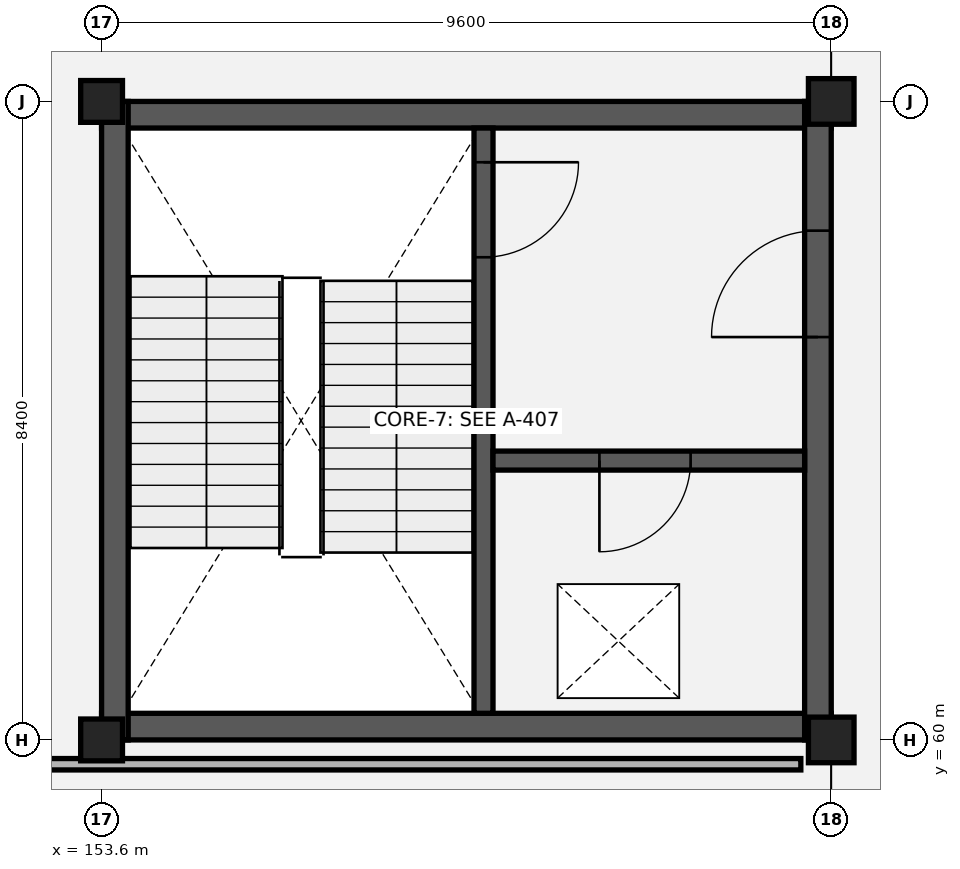
"""IFC4 building model, lengths in metres.
Left out: names, types, materials, properties, quantities, classifications, styles, units other than length and angle.
Written with IfcOpenShell. Run it as: python <this file> out.ifc"""

import sys

from ifc_helpers import new_model, si_unit, direction, frame, frame_2d, origin, origin_2d, place, context, subcontext, project, spatial, rectangle, extrude, element, fill, save


model = new_model("IFC4")
c1 = context("Model", 3, precision=1e-05, world=origin(), true_north=direction((0.0, 1.0)))
c2 = subcontext(c1, "Body", "Model", "MODEL_VIEW")
j1 = project(units=[si_unit("LENGTHUNIT", "METRE"), si_unit("PLANEANGLEUNIT", "RADIAN")], contexts=[c1])
p1 = place(None, origin())
s1 = spatial("IfcSite", under=j1, at=p1, CompositionType="ELEMENT")
p2 = place(p1, origin())
s2 = spatial("IfcBuilding", under=s1, at=p2, CompositionType="ELEMENT")
p3 = place(p2, frame((0.0, 0.0, 5.4)))
s3 = spatial("IfcBuildingStorey", under=s2, at=p3, CompositionType="ELEMENT", Elevation=5.4)
for number, where, z_axis, x_axis in (
    (1, (153.6, 60.0, 0.0), (0.0, 0.0, 1.0), (1.0, 0.0, 0.0)),
    (2, (153.6, 68.4, 0.0), (0.0, 0.0, 1.0), (1.0, 0.0, 0.0)),
):
    element("IfcColumn", number, at=place(p3, frame(where, z_axis=z_axis, x_axis=x_axis)), inside=s3, PredefinedType="COLUMN", context=c2, shape_type="SweptSolid", body=[
        extrude(rectangle(XDim=0.55, YDim=0.55, at=origin_2d()), origin(), (0.0, 0.0, 1.0), 4.8),
    ])
for number, where, z_axis, x_axis in (
    (3, (163.2, 60.0, 0.0), (0.0, 0.0, 1.0), (1.0, 0.0, 0.0)),
    (4, (163.2, 68.4, 0.0), (0.0, 0.0, 1.0), (1.0, 0.0, 0.0)),
):
    element("IfcColumn", number, at=place(p3, frame(where, z_axis=z_axis, x_axis=x_axis)), inside=s3, PredefinedType="COLUMN", context=c2, shape_type="SweptSolid", body=[
        extrude(rectangle(XDim=0.6, YDim=0.6, at=origin_2d()), origin(), (0.0, 0.0, 1.0), 4.8),
    ])
for number, where, z_axis, x_axis in (
    (5, (153.6, 68.225, 0.0), (0.0, 0.0, 1.0), (1.0, 0.0, 0.0)),
    (6, (153.6, 60.175, 0.0), (0.0, 0.0, 1.0), (1.0, 0.0, 0.0)),
):
    element("IfcWall", number, at=place(p3, frame(where, z_axis=z_axis, x_axis=x_axis)), inside=s3, PredefinedType="SHEAR", context=c2, shape_type="SweptSolid", body=[
        extrude(rectangle(XDim=9.6, YDim=0.35, at=frame_2d((4.8, 0.0))), origin(), (0.0, 0.0, 1.0), 4.48),
    ])
p4 = place(p3, frame((153.775, 60.0, 0.0), z_axis=(0.0, 0.0, 1.0), x_axis=(0.0, 1.0, 0.0)))
e7 = element("IfcWall", 7, at=p4, inside=s3, PredefinedType="SHEAR", context=c2, shape_type="SweptSolid", body=[
    extrude(rectangle(XDim=8.4, YDim=0.35, at=frame_2d((4.2, 0.0))), origin(), (0.0, 0.0, 1.0), 4.48),
])
p5 = place(p3, frame((163.025, 60.0, 0.0), z_axis=(0.0, 0.0, 1.0), x_axis=(0.0, 1.0, 0.0)))
e8 = element("IfcWall", 8, at=p5, inside=s3, PredefinedType="SHEAR", context=c2, shape_type="SweptSolid", body=[
    extrude(rectangle(XDim=8.4, YDim=0.35, at=frame_2d((4.2, 0.0))), origin(), (0.0, 0.0, 1.0), 4.48),
])
p6 = place(p5, frame((5.3, 0.0, 0.0)))
e9 = element("IfcOpeningElement", 9, at=p6, cuts=e8, PredefinedType="OPENING", context=c2, shape_type="SweptSolid", body=[
    extrude(rectangle(XDim=1.4, YDim=2.15, at=frame_2d((0.7, 1.075))), frame((0.0, 0.185, 0.0), z_axis=(0.0, -1.0, 0.0), x_axis=(1.0, 0.0, 0.0)), (0.0, 0.0, 1.0), 0.37),
])
p7 = place(p3, frame((158.625, 68.05, 0.0), z_axis=(0.0, 0.0, 1.0), x_axis=(0.0, -1.0, 0.0)))
e10 = element("IfcWall", 10, at=p7, inside=s3, PredefinedType="SHEAR", context=c2, shape_type="SweptSolid", body=[
    extrude(rectangle(XDim=7.7, YDim=0.25, at=frame_2d((3.85, 0.0))), origin(), (0.0, 0.0, 1.0), 4.48),
])
p8 = place(p7, frame((0.45, 0.0, 0.0)))
e11 = element("IfcOpeningElement", 11, at=p8, cuts=e10, PredefinedType="OPENING", context=c2, shape_type="SweptSolid", body=[
    extrude(rectangle(XDim=1.25, YDim=2.15, at=frame_2d((0.625, 1.075))), frame((0.0, 0.135, 0.0), z_axis=(0.0, -1.0, 0.0), x_axis=(1.0, 0.0, 0.0)), (0.0, 0.0, 1.0), 0.27),
])
p9 = place(p3, frame((158.75, 63.675, 0.0), z_axis=(0.0, 0.0, 1.0), x_axis=(1.0, 0.0, 0.0)))
e12 = element("IfcWall", 12, at=p9, inside=s3, PredefinedType="SHEAR", context=c2, shape_type="SweptSolid", body=[
    extrude(rectangle(XDim=4.1, YDim=0.25, at=frame_2d((2.05, 0.0))), origin(), (0.0, 0.0, 1.0), 4.48),
])
p10 = place(p9, frame((1.4, 0.0, 0.0)))
e13 = element("IfcOpeningElement", 13, at=p10, cuts=e12, PredefinedType="OPENING", context=c2, shape_type="SweptSolid", body=[
    extrude(rectangle(XDim=1.2, YDim=2.15, at=frame_2d((0.6, 1.075))), frame((0.0, 0.135, 0.0), z_axis=(0.0, -1.0, 0.0), x_axis=(1.0, 0.0, 0.0)), (0.0, 0.0, 1.0), 0.27),
])
p11 = place(p3, frame((145.0, 59.68, 0.0), z_axis=(0.0, 0.0, 1.0), x_axis=(1.0, 0.0, 0.0)))
e14 = element("IfcWall", 14, at=p11, inside=s3, PredefinedType="PARTITIONING", context=c2, shape_type="SweptSolid", body=[
    extrude(rectangle(XDim=17.8, YDim=0.15, at=frame_2d((8.9, 0.0))), origin(), (0.0, 0.0, 1.0), 3.26),
])
p12 = place(p8, origin())
e15 = element("IfcDoor", 15, at=p12, inside=s3, OperationType="SINGLE_SWING_LEFT", PredefinedType="DOOR", context=c2, shape_type="SweptSolid", body=[
    extrude(rectangle(XDim=1.25, YDim=2.15, at=frame_2d((0.625, 1.075))), frame((0.0, 0.025, 0.0), z_axis=(0.0, -1.0, 0.0), x_axis=(1.0, 0.0, 0.0)), (0.0, 0.0, 1.0), 0.05),
])
fill(e11, e15)
p13 = place(p10, origin())
e16 = element("IfcDoor", 16, at=p13, inside=s3, OperationType="SINGLE_SWING_RIGHT", PredefinedType="DOOR", context=c2, shape_type="SweptSolid", body=[
    extrude(rectangle(XDim=1.2, YDim=2.15, at=frame_2d((0.6, 1.075))), frame((0.0, 0.025, 0.0), z_axis=(0.0, -1.0, 0.0), x_axis=(1.0, 0.0, 0.0)), (0.0, 0.0, 1.0), 0.05),
])
fill(e13, e16)
p14 = place(p6, origin())
e17 = element("IfcDoor", 17, at=p14, inside=s3, OperationType="SINGLE_SWING_LEFT", PredefinedType="DOOR", context=c2, shape_type="SweptSolid", body=[
    extrude(rectangle(XDim=1.4, YDim=2.15, at=frame_2d((0.7, 1.075))), frame((0.0, 0.025, 0.0), z_axis=(0.0, -1.0, 0.0), x_axis=(1.0, 0.0, 0.0)), (0.0, 0.0, 1.0), 0.05),
])
fill(e9, e17)
save(model, sys.argv[1])
